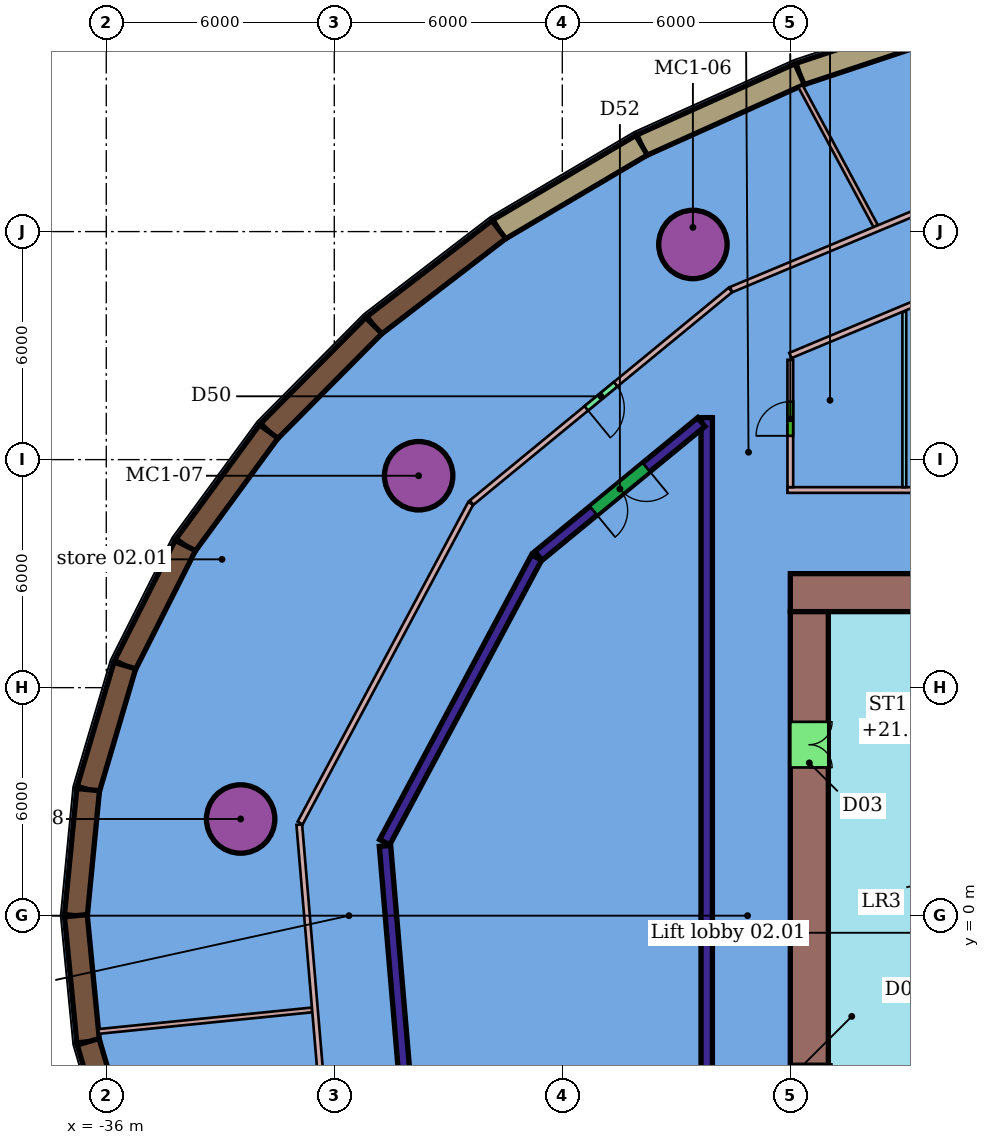
"""IFC4 building model, lengths in metres.
Left out: names, types, materials, properties, quantities, classifications, styles, units other than length and angle.
Written with IfcOpenShell. Run it as: python <this file> out.ifc"""

import sys

from ifc_helpers import new_model, si_unit, direction, frame, frame_2d, origin, origin_2d, place, context, subcontext, project, spatial, rectangle, hollow_circle, extrude, element, fill, save


model = new_model("IFC4")
c1 = context("Model", 3, precision=1e-05, world=origin(), true_north=direction((0.0, 1.0)))
c2 = subcontext(c1, "Body", "Model", "MODEL_VIEW")
j1 = project(units=[si_unit("LENGTHUNIT", "METRE"), si_unit("PLANEANGLEUNIT", "RADIAN")], contexts=[c1])
p1 = place(None, origin())
s1 = spatial("IfcSite", under=j1, at=p1, CompositionType="ELEMENT")
p2 = place(p1, origin())
s2 = spatial("IfcBuilding", under=s1, at=p2, CompositionType="ELEMENT")
p3 = place(p2, frame((0.0, 0.0, 17.0)))
s3 = spatial("IfcBuildingStorey", under=s2, at=p3, CompositionType="ELEMENT", Elevation=17.0)
for number, where, z_axis, x_axis in (
    (1, (-20.563, 17.66, 0.0), (0.0, 0.0, 1.0), (1.0, 0.0, 0.0)),
    (2, (-27.78, 11.576, 0.0), (0.0, 0.0, 1.0), (1.0, 0.0, 0.0)),
    (3, (-32.464, 2.543, 0.0), (0.0, 0.0, 1.0), (1.0, 0.0, 0.0)),
):
    element("IfcColumn", number, at=place(p3, frame(where, z_axis=z_axis, x_axis=x_axis)), inside=s3, PredefinedType="COLUMN", context=c2, shape_type="SweptSolid", body=[
        extrude(hollow_circle(Radius=0.9, WallThickness=0.06, at=origin_2d()), origin(), (0.0, 0.0, 1.0), 8.8),
    ])
p4 = place(p3, frame((-18.075, 11.2, 0.0), z_axis=(0.0, 0.0, 1.0), x_axis=(1.0, 0.0, 0.0)))
e4 = element("IfcWall", 4, at=p4, inside=s3, PredefinedType="PARTITIONING", context=c2, shape_type="SweptSolid", body=[
    extrude(rectangle(XDim=8.825, YDim=0.15, at=frame_2d((4.413, 0.0))), origin(), (0.0, 0.0, 1.0), 8.35),
])
p5 = place(p3, frame((-20.2, -9.15, 0.0), z_axis=(0.0, 0.0, 1.0), x_axis=(0.0, 1.0, 0.0)))
e5 = element("IfcWall", 5, at=p5, inside=s3, PredefinedType="PARTITIONING", context=c2, shape_type="SweptSolid", body=[
    extrude(rectangle(XDim=22.255, YDim=0.3, at=frame_2d((11.127, 0.0))), origin(), (0.0, 0.0, 1.0), 8.35),
])
p6 = place(p3, frame((-18.0, 11.275, 0.0), z_axis=(0.0, 0.0, 1.0), x_axis=(0.0, 1.0, 0.0)))
e6 = element("IfcWall", 6, at=p6, inside=s3, PredefinedType="PARTITIONING", context=c2, shape_type="SweptSolid", body=[
    extrude(rectangle(XDim=3.351, YDim=0.15, at=frame_2d((1.676, 0.0))), origin(), (0.0, 0.0, 1.0), 8.35),
])
p7 = place(p6, frame((1.351, 0.0, 0.0)))
e7 = element("IfcOpeningElement", 7, at=p7, cuts=e6, PredefinedType="OPENING", context=c2, shape_type="SweptSolid", body=[
    extrude(rectangle(XDim=0.9, YDim=2.1, at=frame_2d((0.45, 1.05))), frame((0.0, 0.085, 0.0), z_axis=(0.0, -1.0, 0.0), x_axis=(1.0, 0.0, 0.0)), (0.0, 0.0, 1.0), 0.17),
])
p8 = place(p3, frame((-15.0, 11.275, 0.0), z_axis=(0.0, 0.0, 1.0), x_axis=(0.0, 1.0, 0.0)))
e8 = element("IfcWall", 8, at=p8, inside=s3, PredefinedType="PARTITIONING", context=c2, shape_type="SweptSolid", body=[
    extrude(rectangle(XDim=4.614, YDim=0.1, at=frame_2d((2.307, 0.0))), origin(), (0.0, 0.0, 1.0), 8.35),
])
p9 = place(p3, frame((-11.447, 17.475, 0.0), z_axis=(0.0, 0.0, 1.0), x_axis=(-0.922815313154, -0.385242647961, 0.0)))
e9 = element("IfcWall", 9, at=p9, inside=s3, PredefinedType="PARTITIONING", context=c2, shape_type="SweptSolid", body=[
    extrude(rectangle(XDim=7.102, YDim=0.15, at=frame_2d((3.551, 0.0))), origin(), (0.0, 0.0, 1.0), 8.35),
])
p10 = place(p9, frame((1.938, 0.0, 0.0)))
e10 = element("IfcOpeningElement", 10, at=p10, cuts=e9, PredefinedType="OPENING", context=c2, shape_type="SweptSolid", body=[
    extrude(rectangle(XDim=0.9, YDim=2.1, at=frame_2d((0.45, 1.05))), frame((0.0, 0.085, 0.0), z_axis=(0.0, -1.0, 0.0), x_axis=(1.0, 0.0, 0.0)), (0.0, 0.0, 1.0), 0.17),
])
p11 = place(p3, frame((-28.674, 1.933, 0.0), z_axis=(0.0, 0.0, 1.0), x_axis=(0.470743396375, 0.882270171076, 0.0)))
e11 = element("IfcWall", 11, at=p11, inside=s3, PredefinedType="PARTITIONING", context=c2, shape_type="SweptSolid", body=[
    extrude(rectangle(XDim=8.493, YDim=0.3, at=frame_2d((4.247, 0.0))), origin(), (0.0, 0.0, 1.0), 8.35),
])
p12 = place(p3, frame((-20.341, 12.989, 0.0), z_axis=(0.0, 0.0, 1.0), x_axis=(-0.772581343642, -0.634915795564, 0.0)))
e12 = element("IfcWall", 12, at=p12, inside=s3, PredefinedType="PARTITIONING", context=c2, shape_type="SweptSolid", body=[
    extrude(rectangle(XDim=5.549, YDim=0.3, at=frame_2d((2.774, 0.0))), origin(), (0.0, 0.0, 1.0), 8.35),
])
p13 = place(p12, frame((1.875, 0.0, 0.0)))
e13 = element("IfcOpeningElement", 13, at=p13, cuts=e12, PredefinedType="OPENING", context=c2, shape_type="SweptSolid", body=[
    extrude(rectangle(XDim=1.8, YDim=2.4, at=frame_2d((0.9, 1.2))), frame((0.0, 0.16, 0.0), z_axis=(0.0, -1.0, 0.0), x_axis=(1.0, 0.0, 0.0)), (0.0, 0.0, 1.0), 0.32),
])
p14 = place(p3, frame((-28.666, 1.836, 0.0), z_axis=(0.0, 0.0, 1.0), x_axis=(0.084484314549, -0.996424809303, 0.0)))
e14 = element("IfcWall", 14, at=p14, inside=s3, PredefinedType="PARTITIONING", context=c2, shape_type="SweptSolid", body=[
    extrude(rectangle(XDim=8.369, YDim=0.3, at=frame_2d((4.185, 0.0))), origin(), (0.0, 0.0, 1.0), 8.35),
])
p15 = place(p3, frame((-36.203, -3.047, 0.0), z_axis=(0.0, 0.0, 1.0), x_axis=(0.994949493914, 0.100376812864, 0.0)))
e15 = element("IfcWall", 15, at=p15, inside=s3, PredefinedType="PARTITIONING", context=c2, shape_type="SweptSolid", body=[
    extrude(rectangle(XDim=5.648, YDim=0.125, at=frame_2d((2.824, 0.0))), origin(), (0.0, 0.0, 1.0), 8.35),
])
p16 = place(p3, frame((-17.732, 21.826, 0.0), z_axis=(0.0, 0.0, 1.0), x_axis=(0.473447649948, -0.880821958604, 0.0)))
e16 = element("IfcWall", 16, at=p16, inside=s3, PredefinedType="PARTITIONING", context=c2, shape_type="SweptSolid", body=[
    extrude(rectangle(XDim=4.175, YDim=0.125, at=frame_2d((2.088, 0.0))), origin(), (0.0, 0.0, 1.0), 8.35),
])
p17 = place(p3, frame((-19.556, 16.473, 0.0), z_axis=(0.0, 0.0, 1.0), x_axis=(0.922818121352, 0.385235921097, 0.0)))
e17 = element("IfcWall", 17, at=p17, inside=s3, PredefinedType="PARTITIONING", context=c2, shape_type="SweptSolid", body=[
    extrude(rectangle(XDim=8.184, YDim=0.15, at=frame_2d((4.092, 0.0))), origin(), (0.0, 0.0, 1.0), 8.35),
])
p18 = place(p3, frame((-19.577, 16.465, 0.0), z_axis=(0.0, 0.0, 1.0), x_axis=(-0.772575830308, -0.634922504266, 0.0)))
e18 = element("IfcWall", 18, at=p18, inside=s3, PredefinedType="PARTITIONING", context=c2, shape_type="SweptSolid", body=[
    extrude(rectangle(XDim=8.815, YDim=0.15, at=frame_2d((4.407, 0.0))), origin(), (0.0, 0.0, 1.0), 8.35),
])
p19 = place(p18, frame((3.907, 0.0, 0.0)))
e19 = element("IfcOpeningElement", 19, at=p19, cuts=e18, PredefinedType="OPENING", context=c2, shape_type="SweptSolid", body=[
    extrude(rectangle(XDim=1.0, YDim=2.1, at=frame_2d((0.5, 1.05))), frame((0.0, 0.085, 0.0), z_axis=(0.0, -1.0, 0.0), x_axis=(1.0, 0.0, 0.0)), (0.0, 0.0, 1.0), 0.17),
])
p20 = place(p3, frame((-30.898, 2.438, 0.0), z_axis=(0.0, 0.0, 1.0), x_axis=(0.470742429837, 0.88227068678, 0.0)))
e20 = element("IfcWall", 20, at=p20, inside=s3, PredefinedType="PARTITIONING", context=c2, shape_type="SweptSolid", body=[
    extrude(rectangle(XDim=9.532, YDim=0.15, at=frame_2d((4.766, 0.0))), origin(), (0.0, 0.0, 1.0), 8.35),
])
p21 = place(p3, frame((-30.921, 2.395, 0.0), z_axis=(0.0, 0.0, 1.0), x_axis=(0.084469905026, -0.996426030945, 0.0)))
e21 = element("IfcWall", 21, at=p21, inside=s3, PredefinedType="PARTITIONING", context=c2, shape_type="SweptSolid", body=[
    extrude(rectangle(XDim=9.801, YDim=0.15, at=frame_2d((4.9, 0.0))), origin(), (0.0, 0.0, 1.0), 8.35),
])
p22 = place(p3, frame((-13.264, 23.635, 0.0), z_axis=(0.0, 0.0, 1.0), x_axis=(-0.94901810672, -0.315221561949, 0.0)))
e22 = element("IfcWall", 22, at=p22, inside=s3, PredefinedType="SOLIDWALL", context=c2, shape_type="SweptSolid", body=[
    extrude(rectangle(XDim=4.732, YDim=0.6, at=frame_2d((2.366, 0.0))), origin(), (0.0, 0.0, 1.0), 8.4),
])
p23 = place(p3, frame((-17.755, 22.144, 0.0), z_axis=(0.0, 0.0, 1.0), x_axis=(-0.911894462824, -0.410424766152, 0.0)))
e23 = element("IfcWall", 23, at=p23, inside=s3, PredefinedType="SOLIDWALL", context=c2, shape_type="SweptSolid", body=[
    extrude(rectangle(XDim=4.561, YDim=0.6, at=frame_2d((2.281, 0.0))), origin(), (0.0, 0.0, 1.0), 8.4),
])
p24 = place(p3, frame((-21.915, 20.272, 0.0), z_axis=(0.0, 0.0, 1.0), x_axis=(-0.861017868942, -0.508574703818, 0.0)))
e24 = element("IfcWall", 24, at=p24, inside=s3, PredefinedType="SOLIDWALL", context=c2, shape_type="SweptSolid", body=[
    extrude(rectangle(XDim=4.363, YDim=0.6, at=frame_2d((2.181, 0.0))), origin(), (0.0, 0.0, 1.0), 8.4),
])
p25 = place(p3, frame((-25.671, 18.053, 0.0), z_axis=(0.0, 0.0, 1.0), x_axis=(-0.793065901338, -0.609135843745, 0.0)))
e25 = element("IfcWall", 25, at=p25, inside=s3, PredefinedType="SOLIDWALL", context=c2, shape_type="SweptSolid", body=[
    extrude(rectangle(XDim=4.147, YDim=0.6, at=frame_2d((2.073, 0.0))), origin(), (0.0, 0.0, 1.0), 8.8),
])
p26 = place(p3, frame((-28.959, 15.527, 0.0), z_axis=(0.0, 0.0, 1.0), x_axis=(-0.704303183564, -0.709899306678, 0.0)))
e26 = element("IfcWall", 26, at=p26, inside=s3, PredefinedType="SOLIDWALL", context=c2, shape_type="SweptSolid", body=[
    extrude(rectangle(XDim=3.927, YDim=0.6, at=frame_2d((1.963, 0.0))), origin(), (0.0, 0.0, 1.0), 8.8),
])
p27 = place(p3, frame((-31.725, 12.74, 0.0), z_axis=(0.0, 0.0, 1.0), x_axis=(-0.59073426953, -0.806866174035, 0.0)))
e27 = element("IfcWall", 27, at=p27, inside=s3, PredefinedType="SOLIDWALL", context=c2, shape_type="SweptSolid", body=[
    extrude(rectangle(XDim=3.718, YDim=0.6, at=frame_2d((1.859, 0.0))), origin(), (0.0, 0.0, 1.0), 8.8),
])
p28 = place(p3, frame((-33.921, 9.74, 0.0), z_axis=(0.0, 0.0, 1.0), x_axis=(-0.450137579264, -0.892959215045, 0.0)))
e28 = element("IfcWall", 28, at=p28, inside=s3, PredefinedType="SOLIDWALL", context=c2, shape_type="SweptSolid", body=[
    extrude(rectangle(XDim=3.537, YDim=0.6, at=frame_2d((1.769, 0.0))), origin(), (0.0, 0.0, 1.0), 8.8),
])
p29 = place(p3, frame((-35.513, 6.582, 0.0), z_axis=(0.0, 0.0, 1.0), x_axis=(-0.283226206308, -0.95905313516, 0.0)))
e29 = element("IfcWall", 29, at=p29, inside=s3, PredefinedType="SOLIDWALL", context=c2, shape_type="SweptSolid", body=[
    extrude(rectangle(XDim=3.404, YDim=0.6, at=frame_2d((1.702, 0.0))), origin(), (0.0, 0.0, 1.0), 8.8),
])
for number, where, z_axis, x_axis in (
    (30, (-36.477, 3.317, 0.0), (0.0, 0.0, 1.0), (-0.097, -0.995, 0.0)),
    (31, (-36.8, 0.0, 0.0), (0.0, 0.0, 1.0), (0.097, -0.995, 0.0)),
):
    element("IfcWall", number, at=place(p3, frame(where, z_axis=z_axis, x_axis=x_axis)), inside=s3, PredefinedType="SOLIDWALL", context=c2, shape_type="SweptSolid", body=[
        extrude(rectangle(XDim=3.333, YDim=0.6, at=frame_2d((1.666, 0.0))), origin(), (0.0, 0.0, 1.0), 8.8),
    ])
p30 = place(p3, frame((-36.477, -3.317, 0.0), z_axis=(0.0, 0.0, 1.0), x_axis=(0.283226206308, -0.95905313516, 0.0)))
e32 = element("IfcWall", 32, at=p30, inside=s3, PredefinedType="SOLIDWALL", context=c2, shape_type="SweptSolid", body=[
    extrude(rectangle(XDim=3.404, YDim=0.6, at=frame_2d((1.702, 0.0))), origin(), (0.0, 0.0, 1.0), 8.8),
])
p31 = place(p3, frame((-6.0, 8.5, 0.0), z_axis=(0.0, 0.0, 1.0), x_axis=(-1.0, 0.0, 0.0)))
e33 = element("IfcWall", 33, at=p31, inside=s3, PredefinedType="SHEAR", context=c2, shape_type="SweptSolid", body=[
    extrude(rectangle(XDim=12.0, YDim=1.0, at=frame_2d((6.0, 0.0))), origin(), (0.0, 0.0, 1.0), 8.7),
])
p32 = place(p31, frame((5.2, 0.0, 0.0)))
e34 = element("IfcOpeningElement", 34, at=p32, cuts=e33, PredefinedType="OPENING", context=c2, shape_type="SweptSolid", body=[
    extrude(rectangle(XDim=1.2, YDim=2.1, at=frame_2d((0.6, 1.05))), frame((0.0, 0.51, 0.0), z_axis=(0.0, -1.0, 0.0), x_axis=(1.0, 0.0, 0.0)), (0.0, 0.0, 1.0), 1.02),
])
p33 = place(p3, frame((-17.5, 8.0, 0.0), z_axis=(0.0, 0.0, 1.0), x_axis=(0.0, -1.0, 0.0)))
e35 = element("IfcWall", 35, at=p33, inside=s3, PredefinedType="SHEAR", context=c2, shape_type="SweptSolid", body=[
    extrude(rectangle(XDim=16.0, YDim=1.0, at=frame_2d((8.0, 0.0))), origin(), (0.0, 0.0, 1.0), 8.7),
])
p34 = place(p33, frame((11.9, 0.0, 0.0)))
e36 = element("IfcOpeningElement", 36, at=p34, cuts=e35, PredefinedType="OPENING", context=c2, shape_type="SweptSolid", body=[
    extrude(rectangle(XDim=1.2, YDim=2.1, at=frame_2d((0.6, 1.05))), frame((0.0, 0.51, 0.0), z_axis=(0.0, -1.0, 0.0), x_axis=(1.0, 0.0, 0.0)), (0.0, 0.0, 1.0), 1.02),
])
p35 = place(p33, frame((2.9, 0.0, 0.0)))
e37 = element("IfcOpeningElement", 37, at=p35, cuts=e35, PredefinedType="OPENING", context=c2, shape_type="SweptSolid", body=[
    extrude(rectangle(XDim=1.2, YDim=2.1, at=frame_2d((0.6, 1.05))), frame((0.0, 0.51, 0.0), z_axis=(0.0, -1.0, 0.0), x_axis=(1.0, 0.0, 0.0)), (0.0, 0.0, 1.0), 1.02),
])
p36 = place(p7, origin())
e38 = element("IfcDoor", 38, at=p36, inside=s3, OperationType="SINGLE_SWING_LEFT", PredefinedType="DOOR", context=c2, shape_type="SweptSolid", body=[
    extrude(rectangle(XDim=0.9, YDim=2.1, at=frame_2d((0.45, 1.05))), frame((0.0, 0.025, 0.0), z_axis=(0.0, -1.0, 0.0), x_axis=(1.0, 0.0, 0.0)), (0.0, 0.0, 1.0), 0.05),
])
fill(e7, e38)
p37 = place(p13, origin())
e39 = element("IfcDoor", 39, at=p37, inside=s3, OperationType="DOUBLE_DOOR_SINGLE_SWING", PredefinedType="DOOR", context=c2, shape_type="SweptSolid", body=[
    extrude(rectangle(XDim=1.8, YDim=2.4, at=frame_2d((0.9, 1.2))), frame((0.0, 0.025, 0.0), z_axis=(0.0, -1.0, 0.0), x_axis=(1.0, 0.0, 0.0)), (0.0, 0.0, 1.0), 0.05),
])
fill(e13, e39)
p38 = place(p19, origin())
e40 = element("IfcDoor", 40, at=p38, inside=s3, OperationType="SINGLE_SWING_RIGHT", PredefinedType="DOOR", context=c2, shape_type="SweptSolid", body=[
    extrude(rectangle(XDim=1.0, YDim=2.1, at=frame_2d((0.5, 1.05))), frame((0.0, 0.025, 0.0), z_axis=(0.0, -1.0, 0.0), x_axis=(1.0, 0.0, 0.0)), (0.0, 0.0, 1.0), 0.05),
])
fill(e19, e40)
p39 = place(p34, origin())
e41 = element("IfcDoor", 41, at=p39, inside=s3, OperationType="DOUBLE_DOOR_SINGLE_SWING", PredefinedType="NOTDEFINED", context=c2, shape_type="SweptSolid", body=[
    extrude(rectangle(XDim=1.2, YDim=2.1, at=frame_2d((0.6, 1.05))), frame((0.0, 0.025, 0.0), z_axis=(0.0, -1.0, 0.0), x_axis=(1.0, 0.0, 0.0)), (0.0, 0.0, 1.0), 0.05),
])
fill(e36, e41)
p40 = place(p35, origin())
e42 = element("IfcDoor", 42, at=p40, inside=s3, OperationType="DOUBLE_DOOR_SINGLE_SWING", PredefinedType="NOTDEFINED", context=c2, shape_type="SweptSolid", body=[
    extrude(rectangle(XDim=1.2, YDim=2.1, at=frame_2d((0.6, 1.05))), frame((0.0, 0.025, 0.0), z_axis=(0.0, -1.0, 0.0), x_axis=(1.0, 0.0, 0.0)), (0.0, 0.0, 1.0), 0.05),
])
fill(e37, e42)
save(model, sys.argv[1])
